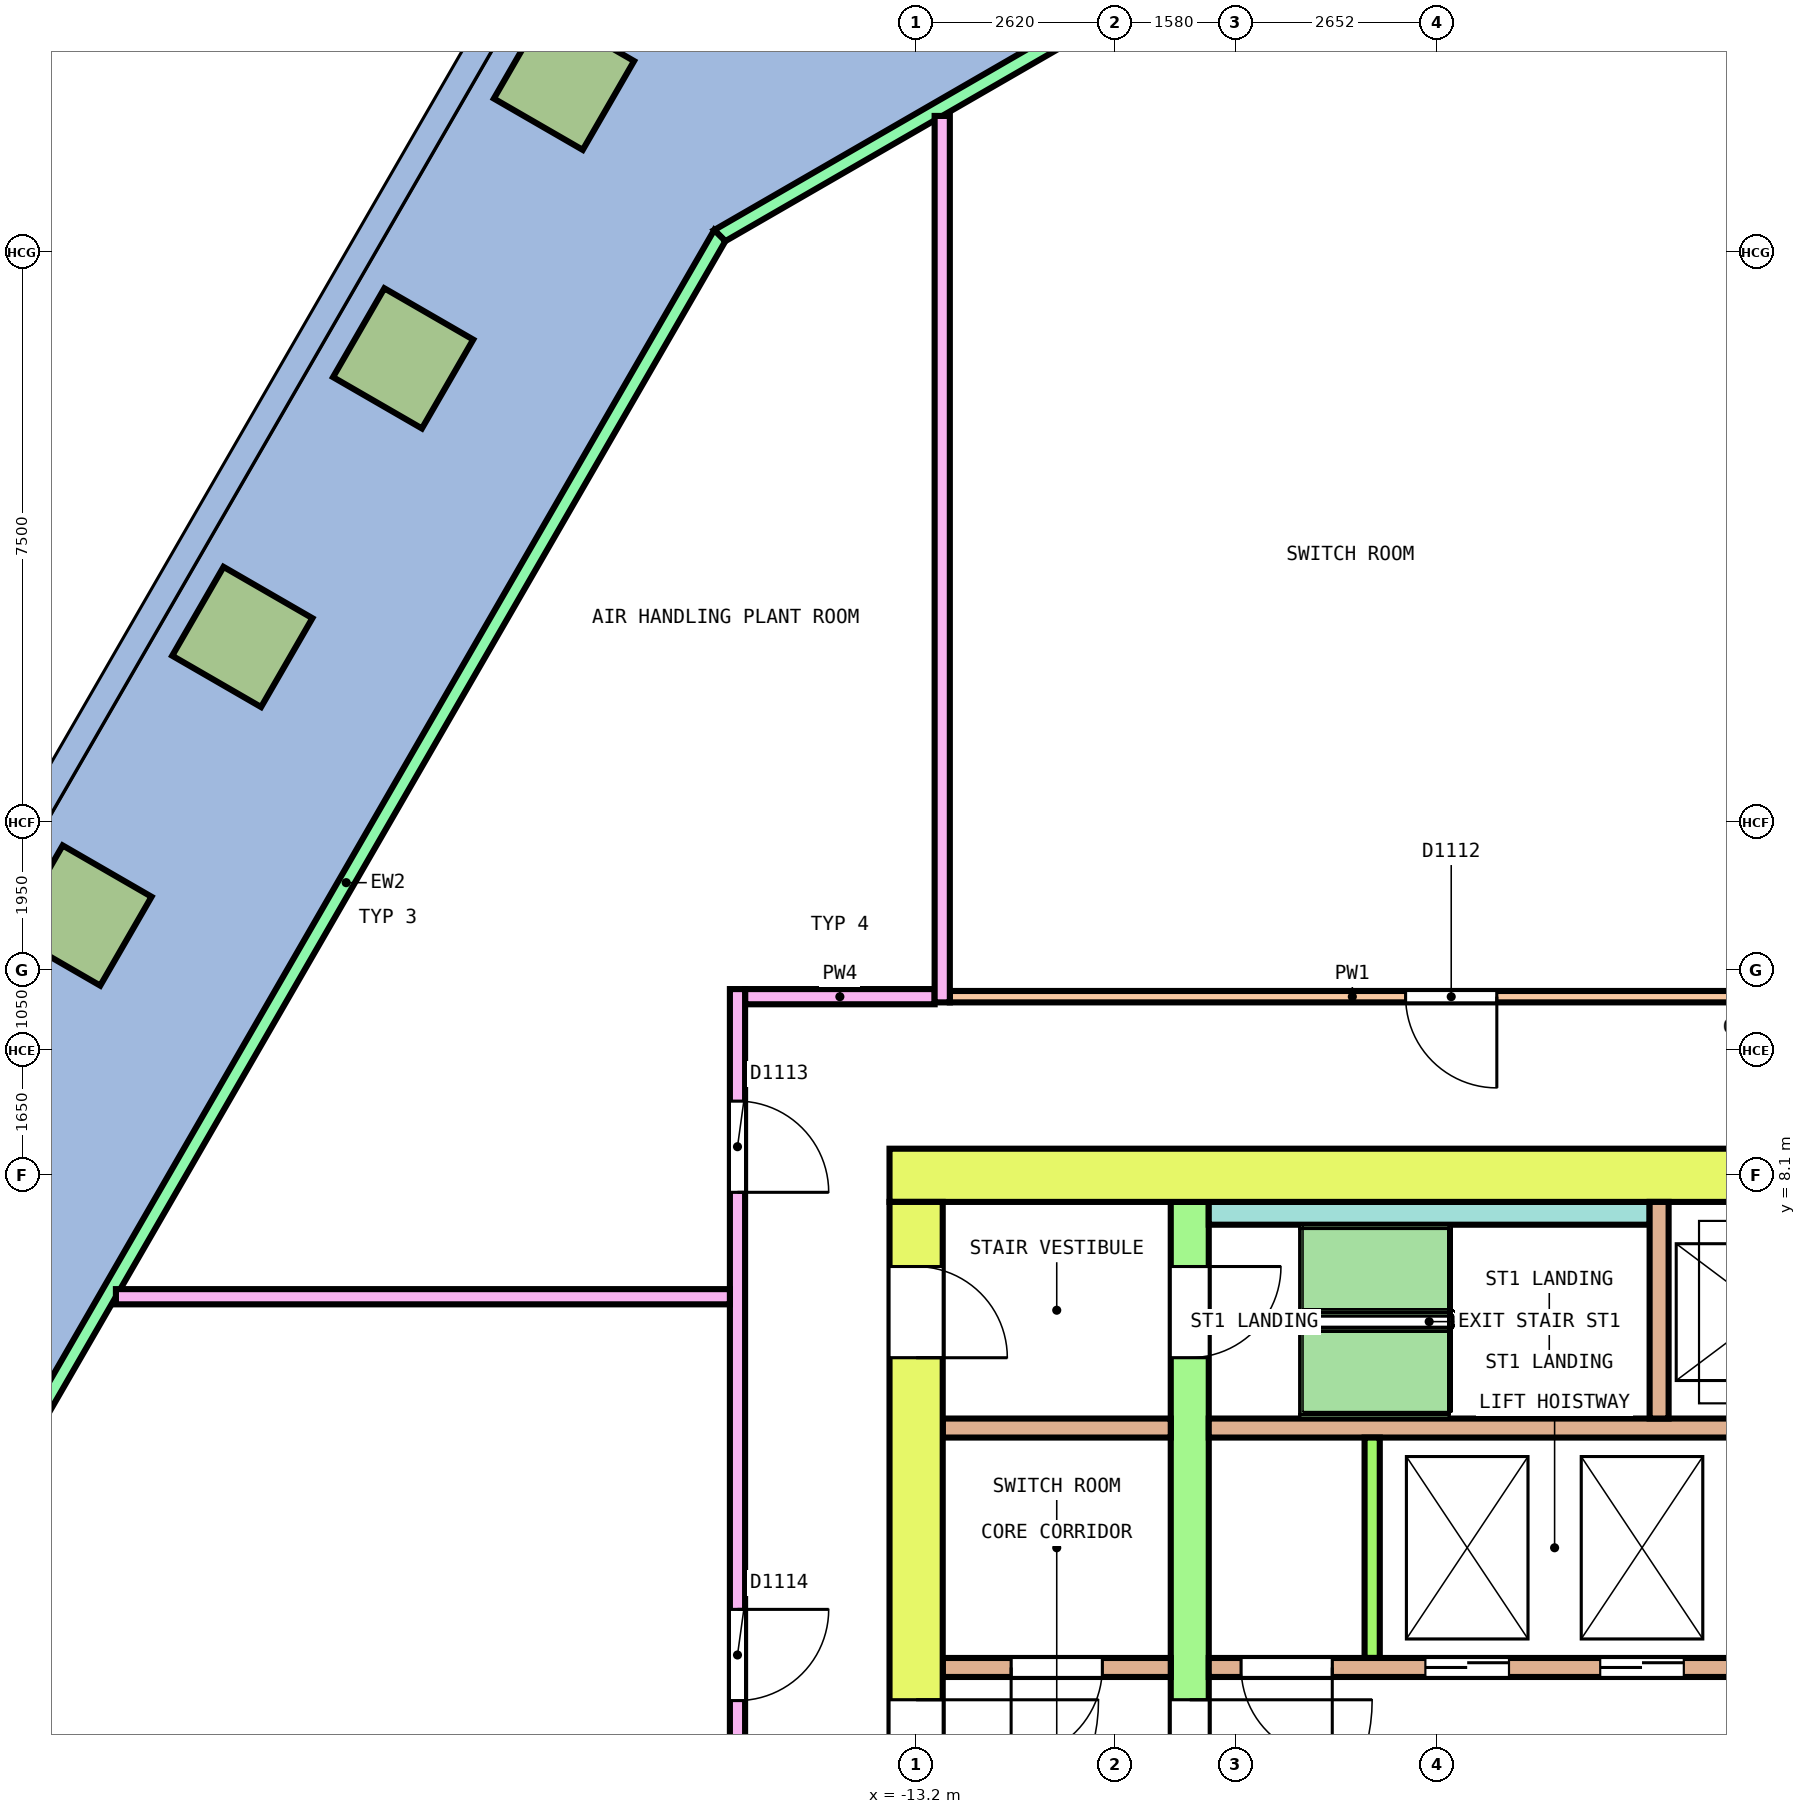
"""IFC4 building model, lengths in metres.
Left out: names, types, materials, properties, quantities, classifications, styles, units other than length and angle.
Written with IfcOpenShell. Run it as: python <this file> out.ifc"""

import sys

from ifc_helpers import new_model, si_unit, direction, frame, frame_2d, origin, origin_2d, place, context, subcontext, project, spatial, polyline, rectangle, outline, extrude, element, fill, save


model = new_model("IFC4")
c1 = context("Model", 3, precision=1e-05, world=origin(), true_north=direction((0.0, 1.0)))
c2 = subcontext(c1, "Body", "Model", "MODEL_VIEW")
j1 = project(units=[si_unit("LENGTHUNIT", "METRE"), si_unit("PLANEANGLEUNIT", "RADIAN")], contexts=[c1])
p1 = place(None, origin())
s1 = spatial("IfcSite", under=j1, at=p1, CompositionType="ELEMENT")
p2 = place(p1, origin())
s2 = spatial("IfcBuilding", under=s1, at=p2, CompositionType="ELEMENT")
p3 = place(p2, frame((0.0, 0.0, 139.6)))
s3 = spatial("IfcBuildingStorey", under=s2, at=p3, CompositionType="ELEMENT", Elevation=139.6)
for number, where, z_axis, x_axis in (
    (1, (-17.833, 22.512, 0.0), (0.0, 0.0, 1.0), (-0.5, -0.866, 0.0)),
    (2, (-19.949, 18.847, 0.0), (0.0, 0.0, 1.0), (-0.5, -0.866, 0.0)),
    (3, (-22.065, 15.183, 0.0), (0.0, 0.0, 1.0), (-0.5, -0.866, 0.0)),
    (4, (-24.181, 11.518, 0.0), (0.0, 0.0, 1.0), (-0.5, -0.866, 0.0)),
):
    element("IfcColumn", number, at=place(p3, frame(where, z_axis=z_axis, x_axis=x_axis)), inside=s3, PredefinedType="COLUMN", context=c2, shape_type="SweptSolid", body=[
        extrude(rectangle(XDim=1.35, YDim=1.35, at=origin_2d()), origin(), (0.0, 0.0, 1.0), 5.25),
    ])
p4 = place(p3, frame((-10.263, 23.65, 0.0), z_axis=(0.0, 0.0, 1.0), x_axis=(-0.866026138243, -0.499998727878, 0.0)))
e5 = element("IfcWall", 5, at=p4, inside=s3, PredefinedType="SOLIDWALL", context=c2, shape_type="SweptSolid", body=[
    extrude(outline(polyline([(-0.027, -0.1), (6.401, -0.1), (6.348, 0.1), (0.027, 0.1), (-0.027, -0.1)])), origin(), (0.0, 0.0, 1.0), 4.55),
])
p5 = place(p3, frame((-15.783, 20.463, 0.0), z_axis=(0.0, 0.0, 1.0), x_axis=(-0.499999083763, -0.866025932773, 0.0)))
e6 = element("IfcWall", 6, at=p5, inside=s3, PredefinedType="SOLIDWALL", context=c2, shape_type="SweptSolid", body=[
    extrude(outline(polyline([(-0.027, -0.1), (19.686, -0.1), (19.632, 0.1), (0.027, 0.1), (-0.027, -0.1)])), origin(), (0.0, 0.0, 1.0), 4.55),
])
p6 = place(p3, frame((-13.55, 8.1, 0.0), z_axis=(0.0, 0.0, 1.0), x_axis=(1.0, 0.0, 0.0)))
e7 = element("IfcWall", 7, at=p6, inside=s3, PredefinedType="SHEAR", context=c2, shape_type="SweptSolid", body=[
    extrude(rectangle(XDim=27.1, YDim=0.7, at=frame_2d((13.55, 0.0))), origin(), (0.0, 0.0, 1.0), 5.3),
])
p7 = place(p6, frame((14.475, 0.0, 0.0)))
e8 = element("IfcOpeningElement", 8, at=p7, cuts=e7, PredefinedType="OPENING", context=c2, shape_type="SweptSolid", body=[
    extrude(rectangle(XDim=1.4, YDim=2.1, at=frame_2d((0.7, 1.05))), frame((0.0, 0.36, 0.0), z_axis=(0.0, -1.0, 0.0), x_axis=(1.0, 0.0, 0.0)), (0.0, 0.0, 1.0), 0.72),
])
p8 = place(p3, frame((-13.2, -7.75, 0.0), z_axis=(0.0, 0.0, 1.0), x_axis=(0.0, 1.0, 0.0)))
e9 = element("IfcWall", 9, at=p8, inside=s3, PredefinedType="SHEAR", context=c2, shape_type="SweptSolid", body=[
    extrude(rectangle(XDim=15.5, YDim=0.7, at=frame_2d((7.75, 0.0))), origin(), (0.0, 0.0, 1.0), 5.3),
])
p9 = place(p8, frame((6.55, 0.0, 0.0)))
e10 = element("IfcOpeningElement", 10, at=p9, cuts=e9, PredefinedType="OPENING", context=c2, shape_type="SweptSolid", body=[
    extrude(rectangle(XDim=2.4, YDim=2.1, at=frame_2d((1.2, 1.05))), frame((0.0, 0.36, 0.0), z_axis=(0.0, -1.0, 0.0), x_axis=(1.0, 0.0, 0.0)), (0.0, 0.0, 1.0), 0.72),
])
p10 = place(p8, frame((13.45, 0.0, 0.0)))
e11 = element("IfcOpeningElement", 11, at=p10, cuts=e9, PredefinedType="OPENING", context=c2, shape_type="SweptSolid", body=[
    extrude(rectangle(XDim=1.2, YDim=2.1, at=frame_2d((0.6, 1.05))), frame((0.0, 0.36, 0.0), z_axis=(0.0, -1.0, 0.0), x_axis=(1.0, 0.0, 0.0)), (0.0, 0.0, 1.0), 0.72),
])
p11 = place(p8, frame((0.85, 0.0, 0.0)))
e12 = element("IfcOpeningElement", 12, at=p11, cuts=e9, PredefinedType="OPENING", context=c2, shape_type="SweptSolid", body=[
    extrude(rectangle(XDim=1.2, YDim=2.1, at=frame_2d((0.6, 1.05))), frame((0.0, 0.36, 0.0), z_axis=(0.0, -1.0, 0.0), x_axis=(1.0, 0.0, 0.0)), (0.0, 0.0, 1.0), 0.72),
])
p12 = place(p3, frame((-9.6, -7.75, 0.0), z_axis=(0.0, 0.0, 1.0), x_axis=(0.0, 1.0, 0.0)))
e13 = element("IfcWall", 13, at=p12, inside=s3, PredefinedType="SHEAR", context=c2, shape_type="SweptSolid", body=[
    extrude(rectangle(XDim=15.5, YDim=0.5, at=frame_2d((7.75, 0.0))), origin(), (0.0, 0.0, 1.0), 5.3),
])
p13 = place(p12, frame((6.55, 0.0, 0.0)))
e14 = element("IfcOpeningElement", 14, at=p13, cuts=e13, PredefinedType="OPENING", context=c2, shape_type="SweptSolid", body=[
    extrude(rectangle(XDim=2.4, YDim=2.1, at=frame_2d((1.2, 1.05))), frame((0.0, 0.26, 0.0), z_axis=(0.0, -1.0, 0.0), x_axis=(1.0, 0.0, 0.0)), (0.0, 0.0, 1.0), 0.52),
])
p14 = place(p12, frame((13.45, 0.0, 0.0)))
e15 = element("IfcOpeningElement", 15, at=p14, cuts=e13, PredefinedType="OPENING", context=c2, shape_type="SweptSolid", body=[
    extrude(rectangle(XDim=1.2, YDim=2.1, at=frame_2d((0.6, 1.05))), frame((0.0, 0.26, 0.0), z_axis=(0.0, -1.0, 0.0), x_axis=(1.0, 0.0, 0.0)), (0.0, 0.0, 1.0), 0.52),
])
p15 = place(p12, frame((0.85, 0.0, 0.0)))
e16 = element("IfcOpeningElement", 16, at=p15, cuts=e13, PredefinedType="OPENING", context=c2, shape_type="SweptSolid", body=[
    extrude(rectangle(XDim=1.2, YDim=2.1, at=frame_2d((0.6, 1.05))), frame((0.0, 0.26, 0.0), z_axis=(0.0, -1.0, 0.0), x_axis=(1.0, 0.0, 0.0)), (0.0, 0.0, 1.0), 0.52),
])
p16 = place(p3, frame((-12.85, 1.625, 0.0), z_axis=(0.0, 0.0, 1.0), x_axis=(1.0, 0.0, 0.0)))
e17 = element("IfcWall", 17, at=p16, inside=s3, PredefinedType="SOLIDWALL", context=c2, shape_type="SweptSolid", body=[
    extrude(rectangle(XDim=3.0, YDim=0.25, at=frame_2d((1.5, 0.0))), origin(), (0.0, 0.0, 1.0), 5.3),
])
p17 = place(p16, frame((0.9, 0.0, 0.0)))
e18 = element("IfcOpeningElement", 18, at=p17, cuts=e17, PredefinedType="OPENING", context=c2, shape_type="SweptSolid", body=[
    extrude(rectangle(XDim=1.2, YDim=2.1, at=frame_2d((0.6, 1.05))), frame((0.0, 0.135, 0.0), z_axis=(0.0, -1.0, 0.0), x_axis=(1.0, 0.0, 0.0)), (0.0, 0.0, 1.0), 0.27),
])
p18 = place(p3, frame((-9.35, 1.625, 0.0), z_axis=(0.0, 0.0, 1.0), x_axis=(1.0, 0.0, 0.0)))
e19 = element("IfcWall", 19, at=p18, inside=s3, PredefinedType="SOLIDWALL", context=c2, shape_type="SweptSolid", body=[
    extrude(rectangle(XDim=18.7, YDim=0.25, at=frame_2d((9.35, 0.0))), origin(), (0.0, 0.0, 1.0), 5.3),
])
p19 = place(p18, frame((2.85, 0.0, 0.0)))
e20 = element("IfcOpeningElement", 20, at=p19, cuts=e19, PredefinedType="OPENING", context=c2, shape_type="SweptSolid", body=[
    extrude(rectangle(XDim=1.1, YDim=2.1, at=frame_2d((0.55, 1.05))), frame((0.0, 0.135, 0.0), z_axis=(0.0, -1.0, 0.0), x_axis=(1.0, 0.0, 0.0)), (0.0, 0.0, 1.0), 0.27),
])
p20 = place(p18, frame((5.15, 0.0, 0.0)))
e21 = element("IfcOpeningElement", 21, at=p20, cuts=e19, PredefinedType="OPENING", context=c2, shape_type="SweptSolid", body=[
    extrude(rectangle(XDim=1.1, YDim=2.1, at=frame_2d((0.55, 1.05))), frame((0.0, 0.135, 0.0), z_axis=(0.0, -1.0, 0.0), x_axis=(1.0, 0.0, 0.0)), (0.0, 0.0, 1.0), 0.27),
])
p21 = place(p18, frame((14.8, 0.0, 0.0)))
e22 = element("IfcOpeningElement", 22, at=p21, cuts=e19, PredefinedType="OPENING", context=c2, shape_type="SweptSolid", body=[
    extrude(rectangle(XDim=1.1, YDim=2.1, at=frame_2d((0.55, 1.05))), frame((0.0, 0.135, 0.0), z_axis=(0.0, -1.0, 0.0), x_axis=(1.0, 0.0, 0.0)), (0.0, 0.0, 1.0), 0.27),
])
p22 = place(p18, frame((0.425, 0.0, 0.0)))
e23 = element("IfcOpeningElement", 23, at=p22, cuts=e19, PredefinedType="OPENING", context=c2, shape_type="SweptSolid", body=[
    extrude(rectangle(XDim=1.2, YDim=2.1, at=frame_2d((0.6, 1.05))), frame((0.0, 0.135, 0.0), z_axis=(0.0, -1.0, 0.0), x_axis=(1.0, 0.0, 0.0)), (0.0, 0.0, 1.0), 0.27),
])
p23 = place(p18, frame((17.075, 0.0, 0.0)))
e24 = element("IfcOpeningElement", 24, at=p23, cuts=e19, PredefinedType="OPENING", context=c2, shape_type="SweptSolid", body=[
    extrude(rectangle(XDim=1.2, YDim=2.1, at=frame_2d((0.6, 1.05))), frame((0.0, 0.135, 0.0), z_axis=(0.0, -1.0, 0.0), x_axis=(1.0, 0.0, 0.0)), (0.0, 0.0, 1.0), 0.27),
])
p24 = place(p3, frame((-12.85, 4.775, 0.0), z_axis=(0.0, 0.0, 1.0), x_axis=(1.0, 0.0, 0.0)))
e25 = element("IfcWall", 25, at=p24, inside=s3, PredefinedType="SOLIDWALL", context=c2, shape_type="SweptSolid", body=[
    extrude(rectangle(XDim=3.0, YDim=0.25, at=frame_2d((1.5, 0.0))), origin(), (0.0, 0.0, 1.0), 5.3),
])
p25 = place(p3, frame((-9.35, 4.775, 0.0), z_axis=(0.0, 0.0, 1.0), x_axis=(1.0, 0.0, 0.0)))
e26 = element("IfcWall", 26, at=p25, inside=s3, PredefinedType="SOLIDWALL", context=c2, shape_type="SweptSolid", body=[
    extrude(rectangle(XDim=18.7, YDim=0.25, at=frame_2d((9.35, 0.0))), origin(), (0.0, 0.0, 1.0), 5.3),
])
p26 = place(p3, frame((-7.2, 1.75, 0.0), z_axis=(0.0, 0.0, 1.0), x_axis=(0.0, 1.0, 0.0)))
e27 = element("IfcWall", 27, at=p26, inside=s3, PredefinedType="SOLIDWALL", context=c2, shape_type="SweptSolid", body=[
    extrude(rectangle(XDim=2.9, YDim=0.2, at=frame_2d((1.45, 0.0))), origin(), (0.0, 0.0, 1.0), 5.3),
])
p27 = place(p3, frame((-9.35, 7.6, 0.0), z_axis=(0.0, 0.0, 1.0), x_axis=(1.0, 0.0, 0.0)))
e28 = element("IfcWall", 28, at=p27, inside=s3, PredefinedType="SOLIDWALL", context=c2, shape_type="SweptSolid", body=[
    extrude(rectangle(XDim=5.8, YDim=0.3, at=frame_2d((2.9, 0.0))), origin(), (0.0, 0.0, 1.0), 5.3),
])
p28 = place(p3, frame((-3.425, 4.9, 0.0), z_axis=(0.0, 0.0, 1.0), x_axis=(0.0, 1.0, 0.0)))
e29 = element("IfcWall", 29, at=p28, inside=s3, PredefinedType="SOLIDWALL", context=c2, shape_type="SweptSolid", body=[
    extrude(rectangle(XDim=2.85, YDim=0.25, at=frame_2d((1.425, 0.0))), origin(), (0.0, 0.0, 1.0), 5.3),
])
p29 = place(p3, frame((-12.756, 10.45, 0.0), z_axis=(0.0, 0.0, 1.0), x_axis=(1.0, 0.0, 0.0)))
e30 = element("IfcWall", 30, at=p29, inside=s3, PredefinedType="PARTITIONING", context=c2, shape_type="SweptSolid", body=[
    extrude(rectangle(XDim=10.59, YDim=0.15, at=frame_2d((5.295, 0.0))), origin(), (0.0, 0.0, 1.0), 4.25),
])
p30 = place(p29, frame((5.996, 0.0, 0.0)))
e31 = element("IfcOpeningElement", 31, at=p30, cuts=e30, PredefinedType="OPENING", context=c2, shape_type="SweptSolid", body=[
    extrude(rectangle(XDim=1.2, YDim=2.1, at=frame_2d((0.6, 1.05))), frame((0.0, 0.085, 0.0), z_axis=(0.0, -1.0, 0.0), x_axis=(1.0, 0.0, 0.0)), (0.0, 0.0, 1.0), 0.17),
])
p31 = place(p3, frame((-15.45, 10.45, 0.0), z_axis=(0.0, 0.0, 1.0), x_axis=(1.0, 0.0, 0.0)))
e32 = element("IfcWall", 32, at=p31, inside=s3, PredefinedType="PARTITIONING", context=c2, shape_type="SweptSolid", body=[
    extrude(rectangle(XDim=2.494, YDim=0.2, at=frame_2d((1.247, 0.0))), origin(), (0.0, 0.0, 1.0), 4.25),
])
p32 = place(p3, frame((-15.55, -10.35, 0.0), z_axis=(0.0, 0.0, 1.0), x_axis=(0.0, 1.0, 0.0)))
e33 = element("IfcWall", 33, at=p32, inside=s3, PredefinedType="PARTITIONING", context=c2, shape_type="SweptSolid", body=[
    extrude(rectangle(XDim=20.9, YDim=0.2, at=frame_2d((10.45, 0.0))), origin(), (0.0, 0.0, 1.0), 4.25),
])
p33 = place(p32, frame((18.226, 0.0, 0.0)))
e34 = element("IfcOpeningElement", 34, at=p33, cuts=e33, PredefinedType="OPENING", context=c2, shape_type="SweptSolid", body=[
    extrude(rectangle(XDim=1.2, YDim=2.1, at=frame_2d((0.6, 1.05))), frame((0.0, 0.11, 0.0), z_axis=(0.0, -1.0, 0.0), x_axis=(1.0, 0.0, 0.0)), (0.0, 0.0, 1.0), 0.22),
])
p34 = place(p32, frame((11.539, 0.0, 0.0)))
e35 = element("IfcOpeningElement", 35, at=p34, cuts=e33, PredefinedType="OPENING", context=c2, shape_type="SweptSolid", body=[
    extrude(rectangle(XDim=1.2, YDim=2.1, at=frame_2d((0.6, 1.05))), frame((0.0, 0.11, 0.0), z_axis=(0.0, -1.0, 0.0), x_axis=(1.0, 0.0, 0.0)), (0.0, 0.0, 1.0), 0.22),
])
p35 = place(p3, frame((-12.856, 10.375, 0.0), z_axis=(0.0, 0.0, 1.0), x_axis=(0.0, 1.0, 0.0)))
e36 = element("IfcWall", 36, at=p35, inside=s3, PredefinedType="PARTITIONING", context=c2, shape_type="SweptSolid", body=[
    extrude(rectangle(XDim=11.662, YDim=0.2, at=frame_2d((5.831, 0.0))), origin(), (0.0, 0.0, 1.0), 4.25),
])
p36 = place(p3, frame((-23.728, 6.502, 0.0), z_axis=(0.0, 0.0, 1.0), x_axis=(1.0, 0.0, 0.0)))
e37 = element("IfcWall", 37, at=p36, inside=s3, PredefinedType="PARTITIONING", context=c2, shape_type="SweptSolid", body=[
    extrude(rectangle(XDim=8.078, YDim=0.2, at=frame_2d((4.039, 0.0))), origin(), (0.0, 0.0, 1.0), 4.25),
])
p37 = place(p19, origin())
e38 = element("IfcDoor", 38, at=p37, inside=s3, OperationType="DOUBLE_DOOR_SLIDING", PredefinedType="DOOR", context=c2, shape_type="SweptSolid", body=[
    extrude(rectangle(XDim=1.1, YDim=2.1, at=frame_2d((0.55, 1.05))), frame((0.0, 0.075, 0.0), z_axis=(0.0, -1.0, 0.0), x_axis=(1.0, 0.0, 0.0)), (0.0, 0.0, 1.0), 0.15),
])
fill(e20, e38)
p38 = place(p20, origin())
e39 = element("IfcDoor", 39, at=p38, inside=s3, OperationType="DOUBLE_DOOR_SLIDING", PredefinedType="DOOR", context=c2, shape_type="SweptSolid", body=[
    extrude(rectangle(XDim=1.1, YDim=2.1, at=frame_2d((0.55, 1.05))), frame((0.0, 0.075, 0.0), z_axis=(0.0, -1.0, 0.0), x_axis=(1.0, 0.0, 0.0)), (0.0, 0.0, 1.0), 0.15),
])
fill(e21, e39)
p39 = place(p13, origin())
e40 = element("IfcDoor", 40, at=p39, inside=s3, OperationType="DOUBLE_DOOR_SINGLE_SWING", PredefinedType="DOOR", context=c2, shape_type="SweptSolid", body=[
    extrude(rectangle(XDim=2.4, YDim=2.1, at=frame_2d((1.2, 1.05))), frame((0.0, 0.2, 0.0), z_axis=(0.0, -1.0, 0.0), x_axis=(1.0, 0.0, 0.0)), (0.0, 0.0, 1.0), 0.4),
])
fill(e14, e40)
p40 = place(p9, origin())
e41 = element("IfcDoor", 41, at=p40, inside=s3, OperationType="DOUBLE_DOOR_SINGLE_SWING", PredefinedType="DOOR", context=c2, shape_type="SweptSolid", body=[
    extrude(rectangle(XDim=2.4, YDim=2.1, at=frame_2d((1.2, 1.05))), frame((0.0, 0.3, 0.0), z_axis=(0.0, -1.0, 0.0), x_axis=(1.0, 0.0, 0.0)), (0.0, 0.0, 1.0), 0.6),
])
fill(e10, e41)
p41 = place(p14, origin())
e42 = element("IfcDoor", 42, at=p41, inside=s3, OperationType="SINGLE_SWING_RIGHT", PredefinedType="DOOR", context=c2, shape_type="SweptSolid", body=[
    extrude(rectangle(XDim=1.2, YDim=2.1, at=frame_2d((0.6, 1.05))), frame((0.0, 0.2, 0.0), z_axis=(0.0, -1.0, 0.0), x_axis=(1.0, 0.0, 0.0)), (0.0, 0.0, 1.0), 0.4),
])
fill(e15, e42)
p42 = place(p10, origin())
e43 = element("IfcDoor", 43, at=p42, inside=s3, OperationType="SINGLE_SWING_LEFT", PredefinedType="DOOR", context=c2, shape_type="SweptSolid", body=[
    extrude(rectangle(XDim=1.2, YDim=2.1, at=frame_2d((0.6, 1.05))), frame((0.0, 0.3, 0.0), z_axis=(0.0, -1.0, 0.0), x_axis=(1.0, 0.0, 0.0)), (0.0, 0.0, 1.0), 0.6),
])
fill(e11, e43)
p43 = place(p17, origin())
e44 = element("IfcDoor", 44, at=p43, inside=s3, OperationType="SINGLE_SWING_RIGHT", PredefinedType="DOOR", context=c2, shape_type="SweptSolid", body=[
    extrude(rectangle(XDim=1.2, YDim=2.1, at=frame_2d((0.6, 1.05))), frame((0.0, 0.075, 0.0), z_axis=(0.0, -1.0, 0.0), x_axis=(1.0, 0.0, 0.0)), (0.0, 0.0, 1.0), 0.15),
])
fill(e18, e44)
p44 = place(p22, origin())
e45 = element("IfcDoor", 45, at=p44, inside=s3, OperationType="SINGLE_SWING_LEFT", PredefinedType="DOOR", context=c2, shape_type="SweptSolid", body=[
    extrude(rectangle(XDim=1.2, YDim=2.1, at=frame_2d((0.6, 1.05))), frame((0.0, 0.075, 0.0), z_axis=(0.0, -1.0, 0.0), x_axis=(1.0, 0.0, 0.0)), (0.0, 0.0, 1.0), 0.15),
])
fill(e23, e45)
p45 = place(p30, origin())
e46 = element("IfcDoor", 46, at=p45, inside=s3, OperationType="DOUBLE_DOOR_SINGLE_SWING", PredefinedType="DOOR", context=c2, shape_type="SweptSolid", body=[
    extrude(rectangle(XDim=1.2, YDim=2.1, at=frame_2d((0.6, 1.05))), frame((0.0, 0.025, 0.0), z_axis=(0.0, -1.0, 0.0), x_axis=(1.0, 0.0, 0.0)), (0.0, 0.0, 1.0), 0.05),
])
fill(e31, e46)
p46 = place(p33, origin())
e47 = element("IfcDoor", 47, at=p46, inside=s3, OperationType="DOUBLE_DOOR_SINGLE_SWING", PredefinedType="DOOR", context=c2, shape_type="SweptSolid", body=[
    extrude(rectangle(XDim=1.2, YDim=2.1, at=frame_2d((0.6, 1.05))), frame((0.0, 0.025, 0.0), z_axis=(0.0, -1.0, 0.0), x_axis=(1.0, 0.0, 0.0)), (0.0, 0.0, 1.0), 0.05),
])
fill(e34, e47)
p47 = place(p34, origin())
e48 = element("IfcDoor", 48, at=p47, inside=s3, OperationType="DOUBLE_DOOR_SINGLE_SWING", PredefinedType="DOOR", context=c2, shape_type="SweptSolid", body=[
    extrude(rectangle(XDim=1.2, YDim=2.1, at=frame_2d((0.6, 1.05))), frame((0.0, 0.025, 0.0), z_axis=(0.0, -1.0, 0.0), x_axis=(1.0, 0.0, 0.0)), (0.0, 0.0, 1.0), 0.05),
])
fill(e35, e48)
save(model, sys.argv[1])
